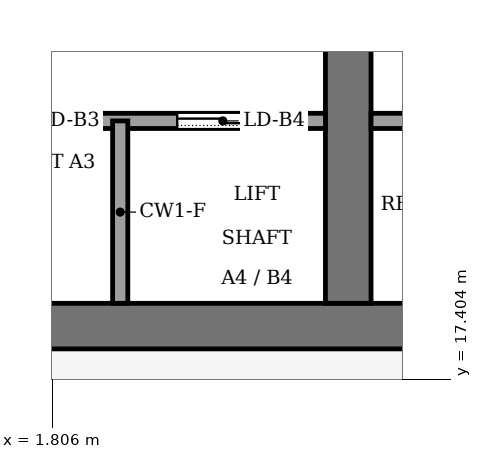
"""IFC4 building model, lengths in metres.
Left out: names, types, materials, properties, quantities, classifications, styles, units other than length and angle.
Written with IfcOpenShell. Run it as: python <this file> out.ifc"""

import sys

from ifc_helpers import new_model, si_unit, direction, frame, frame_2d, origin, place, context, subcontext, project, spatial, rectangle, extrude, element, fill, save


model = new_model("IFC4")
c1 = context("Model", 3, precision=1e-05, world=origin(), true_north=direction((0.0, 1.0)))
c2 = subcontext(c1, "Body", "Model", "MODEL_VIEW")
j1 = project(units=[si_unit("LENGTHUNIT", "METRE"), si_unit("PLANEANGLEUNIT", "RADIAN")], contexts=[c1])
p1 = place(None, origin())
s1 = spatial("IfcSite", under=j1, at=p1, CompositionType="ELEMENT")
p2 = place(p1, origin())
s2 = spatial("IfcBuilding", under=s1, at=p2, CompositionType="ELEMENT")
p3 = place(p2, frame((0.0, 0.0, 314.0)))
s3 = spatial("IfcBuildingStorey", under=s2, at=p3, CompositionType="ELEMENT", Elevation=314.0)
p4 = place(p3, frame((-13.2, 18.1, -0.13), z_axis=(0.0, 0.0, 1.0), x_axis=(1.0, 0.0, 0.0)))
e1 = element("IfcWall", 1, at=p4, inside=s3, PredefinedType="SHEAR", context=c2, shape_type="SweptSolid", body=[
    extrude(rectangle(XDim=26.4, YDim=0.6, at=frame_2d((13.2, 0.0))), origin(), (0.0, 0.0, 1.0), 4.0),
])
p5 = place(p3, frame((5.7, 18.4, -0.13), z_axis=(0.0, 0.0, 1.0), x_axis=(0.0, 1.0, 0.0)))
e2 = element("IfcWall", 2, at=p5, inside=s3, PredefinedType="SHEAR", context=c2, shape_type="SweptSolid", body=[
    extrude(rectangle(XDim=19.2, YDim=0.6, at=frame_2d((9.6, 0.0))), origin(), (0.0, 0.0, 1.0), 4.0),
])
p6 = place(p5, frame((8.35, 0.0, 0.13)))
e3 = element("IfcOpeningElement", 3, at=p6, cuts=e2, PredefinedType="OPENING", context=c2, shape_type="SweptSolid", body=[
    extrude(rectangle(XDim=0.9, YDim=2.1, at=frame_2d((0.45, 1.05))), frame((0.0, 0.31, 0.0), z_axis=(0.0, -1.0, 0.0), x_axis=(1.0, 0.0, 0.0)), (0.0, 0.0, 1.0), 0.62),
])
p7 = place(p5, frame((13.3, 0.0, 0.13)))
e4 = element("IfcOpeningElement", 4, at=p7, cuts=e2, PredefinedType="OPENING", context=c2, shape_type="SweptSolid", body=[
    extrude(rectangle(XDim=2.4, YDim=2.4, at=frame_2d((1.2, 1.2))), frame((0.0, 0.31, 0.0), z_axis=(0.0, -1.0, 0.0), x_axis=(1.0, 0.0, 0.0)), (0.0, 0.0, 1.0), 0.62),
])
p8 = place(p3, frame((-5.4, 20.8, 0.0), z_axis=(0.0, 0.0, 1.0), x_axis=(1.0, 0.0, 0.0)))
e5 = element("IfcWall", 5, at=p8, inside=s3, PredefinedType="PARTITIONING", context=c2, shape_type="SweptSolid", body=[
    extrude(rectangle(XDim=10.8, YDim=0.2, at=frame_2d((5.4, 0.0))), origin(), (0.0, 0.0, 1.0), 3.87),
])
p9 = place(p8, frame((0.75, 0.0, 0.0)))
e6 = element("IfcOpeningElement", 6, at=p9, cuts=e5, PredefinedType="OPENING", context=c2, shape_type="SweptSolid", body=[
    extrude(rectangle(XDim=1.2, YDim=2.2, at=frame_2d((0.6, 1.1))), frame((0.0, 0.11, 0.0), z_axis=(0.0, -1.0, 0.0), x_axis=(1.0, 0.0, 0.0)), (0.0, 0.0, 1.0), 0.22),
])
p10 = place(p8, frame((3.45, 0.0, 0.0)))
e7 = element("IfcOpeningElement", 7, at=p10, cuts=e5, PredefinedType="OPENING", context=c2, shape_type="SweptSolid", body=[
    extrude(rectangle(XDim=1.2, YDim=2.2, at=frame_2d((0.6, 1.1))), frame((0.0, 0.11, 0.0), z_axis=(0.0, -1.0, 0.0), x_axis=(1.0, 0.0, 0.0)), (0.0, 0.0, 1.0), 0.22),
])
p11 = place(p8, frame((6.15, 0.0, 0.0)))
e8 = element("IfcOpeningElement", 8, at=p11, cuts=e5, PredefinedType="OPENING", context=c2, shape_type="SweptSolid", body=[
    extrude(rectangle(XDim=1.2, YDim=2.2, at=frame_2d((0.6, 1.1))), frame((0.0, 0.11, 0.0), z_axis=(0.0, -1.0, 0.0), x_axis=(1.0, 0.0, 0.0)), (0.0, 0.0, 1.0), 0.22),
])
p12 = place(p8, frame((8.85, 0.0, 0.0)))
e9 = element("IfcOpeningElement", 9, at=p12, cuts=e5, PredefinedType="OPENING", context=c2, shape_type="SweptSolid", body=[
    extrude(rectangle(XDim=1.2, YDim=2.2, at=frame_2d((0.6, 1.1))), frame((0.0, 0.11, 0.0), z_axis=(0.0, -1.0, 0.0), x_axis=(1.0, 0.0, 0.0)), (0.0, 0.0, 1.0), 0.22),
])
p13 = place(p3, frame((6.0, 20.8, 0.0), z_axis=(0.0, 0.0, 1.0), x_axis=(1.0, 0.0, 0.0)))
e10 = element("IfcWall", 10, at=p13, inside=s3, PredefinedType="PARTITIONING", context=c2, shape_type="SweptSolid", body=[
    extrude(rectangle(XDim=6.6, YDim=0.2, at=frame_2d((3.3, 0.0))), origin(), (0.0, 0.0, 1.0), 3.87),
])
p14 = place(p13, frame((0.49, 0.0, 0.0)))
e11 = element("IfcOpeningElement", 11, at=p14, cuts=e10, PredefinedType="OPENING", context=c2, shape_type="SweptSolid", body=[
    extrude(rectangle(XDim=1.0, YDim=2.1, at=frame_2d((0.5, 1.05))), frame((0.0, 0.11, 0.0), z_axis=(0.0, -1.0, 0.0), x_axis=(1.0, 0.0, 0.0)), (0.0, 0.0, 1.0), 0.22),
])
p15 = place(p13, frame((3.79, 0.0, 0.0)))
e12 = element("IfcOpeningElement", 12, at=p15, cuts=e10, PredefinedType="OPENING", context=c2, shape_type="SweptSolid", body=[
    extrude(rectangle(XDim=1.0, YDim=2.1, at=frame_2d((0.5, 1.05))), frame((0.0, 0.11, 0.0), z_axis=(0.0, -1.0, 0.0), x_axis=(1.0, 0.0, 0.0)), (0.0, 0.0, 1.0), 0.22),
])
p16 = place(p3, frame((2.7, 18.4, 0.0), z_axis=(0.0, 0.0, 1.0), x_axis=(0.0, 1.0, 0.0)))
e13 = element("IfcWall", 13, at=p16, inside=s3, PredefinedType="PARTITIONING", context=c2, shape_type="SweptSolid", body=[
    extrude(rectangle(XDim=2.4, YDim=0.2, at=frame_2d((1.2, 0.0))), origin(), (0.0, 0.0, 1.0), 3.87),
])
p17 = place(p11, origin())
e14 = element("IfcDoor", 14, at=p17, inside=s3, OperationType="SLIDING_TO_LEFT", PredefinedType="DOOR", context=c2, shape_type="SweptSolid", body=[
    extrude(rectangle(XDim=1.2, YDim=2.2, at=frame_2d((0.6, 1.1))), frame((0.0, 0.025, 0.0), z_axis=(0.0, -1.0, 0.0), x_axis=(1.0, 0.0, 0.0)), (0.0, 0.0, 1.0), 0.05),
])
fill(e8, e14)
p18 = place(p12, origin())
e15 = element("IfcDoor", 15, at=p18, inside=s3, OperationType="SLIDING_TO_LEFT", PredefinedType="DOOR", context=c2, shape_type="SweptSolid", body=[
    extrude(rectangle(XDim=1.2, YDim=2.2, at=frame_2d((0.6, 1.1))), frame((0.0, 0.025, 0.0), z_axis=(0.0, -1.0, 0.0), x_axis=(1.0, 0.0, 0.0)), (0.0, 0.0, 1.0), 0.05),
])
fill(e9, e15)
save(model, sys.argv[1])
